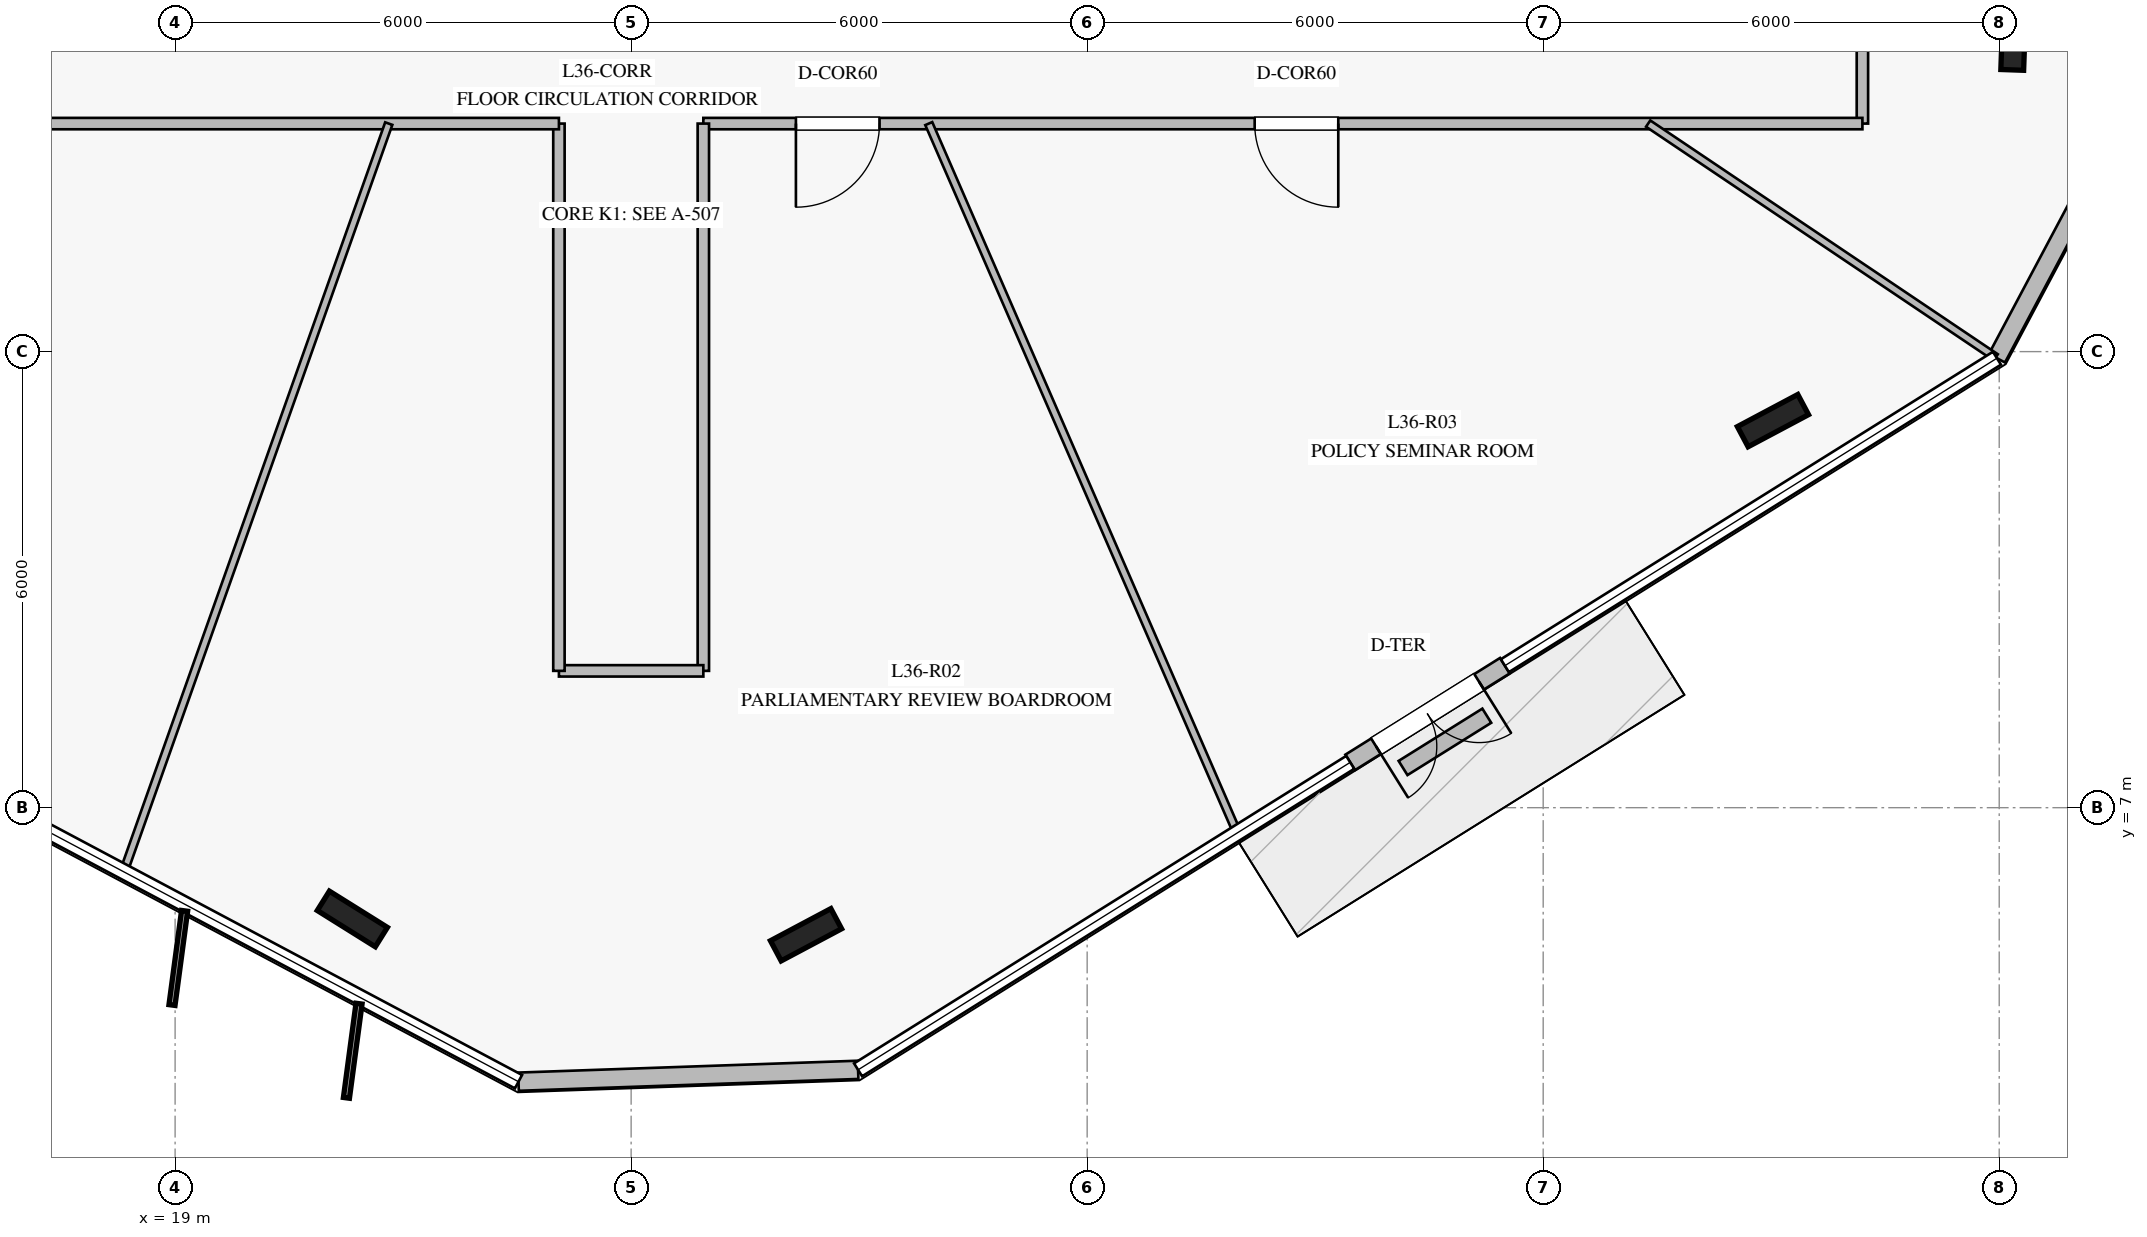
"""IFC4 building model, lengths in metres.
Left out: names, types, materials, properties, quantities, classifications, styles, units other than length and angle.
Written with IfcOpenShell. Run it as: python <this file> out.ifc"""

import sys

from ifc_helpers import new_model, si_unit, direction, frame, frame_2d, origin, origin_2d, place, context, subcontext, project, spatial, rectangle, i_section, extrude, element, fill, save


model = new_model("IFC4")
c1 = context("Model", 3, precision=1e-05, world=origin(), true_north=direction((0.0, 1.0)))
c2 = subcontext(c1, "Body", "Model", "MODEL_VIEW")
j1 = project(units=[si_unit("LENGTHUNIT", "METRE"), si_unit("PLANEANGLEUNIT", "RADIAN")], contexts=[c1])
p1 = place(None, origin())
s1 = spatial("IfcSite", under=j1, at=p1, CompositionType="ELEMENT")
p2 = place(p1, origin())
s2 = spatial("IfcBuilding", under=s1, at=p2, CompositionType="ELEMENT")
p3 = place(p2, frame((0.0, 0.0, 150.4)))
s3 = spatial("IfcBuildingStorey", under=s2, at=p3, CompositionType="ELEMENT", Elevation=150.4)
for number, where, z_axis, x_axis in (
    (1, (21.332, 5.536, 0.0), (0.0, 0.0, 1.0), (-0.848, 0.53, 0.0)),
    (2, (27.301, 5.328, 0.0), (0.0, 0.0, 1.0), (0.883, 0.469, 0.0)),
    (3, (40.023, 12.092, 0.0), (0.0, 0.0, 1.0), (0.883, 0.469, 0.0)),
):
    element("IfcColumn", number, at=place(p3, frame(where, z_axis=z_axis, x_axis=x_axis)), inside=s3, PredefinedType="COLUMN", context=c2, shape_type="SweptSolid", body=[
        extrude(i_section(OverallWidth=0.3, OverallDepth=0.9, WebThickness=0.019, FlangeThickness=0.035, at=origin_2d()), origin(), (0.0, 0.0, 1.0), 4.0),
    ])
p4 = place(p3, frame((23.518, 3.395, 0.0), z_axis=(0.0, 0.0, 1.0), x_axis=(0.999390988908, 0.034894860495, 0.0)))
e4 = element("IfcWall", 4, at=p4, inside=s3, PredefinedType="STANDARD", context=c2, shape_type="SweptSolid", body=[
    extrude(rectangle(XDim=4.471, YDim=0.24, at=frame_2d((2.235, 0.0))), origin(), (0.0, 0.0, 1.0), 3.76),
])
p5 = place(p3, frame((34.461, 7.596, 0.0), z_axis=(0.0, 0.0, 1.0), x_axis=(0.847998304005, 0.529998940003, 0.0)))
e5 = element("IfcWall", 5, at=p5, inside=s3, PredefinedType="STANDARD", context=c2, shape_type="SweptSolid", body=[
    extrude(rectangle(XDim=2.4, YDim=0.24, at=frame_2d((1.2, 0.0))), origin(), (0.0, 0.0, 1.0), 3.76),
])
p6 = place(p5, frame((0.4, 0.0, 0.0)))
e6 = element("IfcOpeningElement", 6, at=p6, cuts=e5, PredefinedType="OPENING", context=c2, shape_type="SweptSolid", body=[
    extrude(rectangle(XDim=1.6, YDim=2.25, at=frame_2d((0.8, 1.125))), frame((0.0, 0.13, 0.0), z_axis=(0.0, -1.0, 0.0), x_axis=(1.0, 0.0, 0.0)), (0.0, 0.0, 1.0), 0.26),
])
p7 = place(p3, frame((42.97, 12.913, 0.0), z_axis=(0.0, 0.0, 1.0), x_axis=(0.46919913514, 0.883092391307, 0.0)))
e7 = element("IfcWall", 7, at=p7, inside=s3, PredefinedType="STANDARD", context=c2, shape_type="SweptSolid", body=[
    extrude(rectangle(XDim=4.472, YDim=0.24, at=frame_2d((2.236, 0.0))), origin(), (0.0, 0.0, 1.0), 3.76),
])
p8 = place(p3, frame((35.156, 7.522, 0.0), z_axis=(0.0, 0.0, 1.0), x_axis=(0.848272680747, 0.52955968417, 0.0)))
e8 = element("IfcWall", 8, at=p8, inside=s3, PredefinedType="USERDEFINED", context=c2, shape_type="SweptSolid", body=[
    extrude(rectangle(XDim=1.299, YDim=0.22, at=frame_2d((0.649, 0.0))), origin(), (0.0, 0.0, 1.0), 0.4),
])
p9 = place(p3, frame((41.2, 17.8, 0.0), z_axis=(0.0, 0.0, 1.0), x_axis=(0.0, -1.0, 0.0)))
e9 = element("IfcWall", 9, at=p9, inside=s3, PredefinedType="PARTITIONING", context=c2, shape_type="SweptSolid", body=[
    extrude(rectangle(XDim=1.8, YDim=0.15, at=frame_2d((0.9, 0.0))), origin(), (0.0, 0.0, 1.0), 3.21),
])
p10 = place(p3, frame((41.2, 16.0, 0.0), z_axis=(0.0, 0.0, 1.0), x_axis=(-1.0, 0.0, 0.0)))
e10 = element("IfcWall", 10, at=p10, inside=s3, PredefinedType="PARTITIONING", context=c2, shape_type="SweptSolid", body=[
    extrude(rectangle(XDim=15.25, YDim=0.15, at=frame_2d((7.625, 0.0))), origin(), (0.0, 0.0, 1.0), 3.21),
])
p11 = place(p10, frame((12.932, 0.0, 0.0)))
e11 = element("IfcOpeningElement", 11, at=p11, cuts=e10, PredefinedType="OPENING", context=c2, shape_type="SweptSolid", body=[
    extrude(rectangle(XDim=1.1, YDim=2.2, at=frame_2d((0.55, 1.1))), frame((0.0, 0.085, 0.0), z_axis=(0.0, -1.0, 0.0), x_axis=(1.0, 0.0, 0.0)), (0.0, 0.0, 1.0), 0.17),
])
p12 = place(p10, frame((6.896, 0.0, 0.0)))
e12 = element("IfcOpeningElement", 12, at=p12, cuts=e10, PredefinedType="OPENING", context=c2, shape_type="SweptSolid", body=[
    extrude(rectangle(XDim=1.1, YDim=2.2, at=frame_2d((0.55, 1.1))), frame((0.0, 0.085, 0.0), z_axis=(0.0, -1.0, 0.0), x_axis=(1.0, 0.0, 0.0)), (0.0, 0.0, 1.0), 0.17),
])
p13 = place(p3, frame((25.95, 16.0, 0.0), z_axis=(0.0, 0.0, 1.0), x_axis=(0.0, -1.0, 0.0)))
e13 = element("IfcWall", 13, at=p13, inside=s3, PredefinedType="PARTITIONING", context=c2, shape_type="SweptSolid", body=[
    extrude(rectangle(XDim=7.2, YDim=0.15, at=frame_2d((3.6, 0.0))), origin(), (0.0, 0.0, 1.0), 3.36),
])
p14 = place(p3, frame((25.95, 8.8, 0.0), z_axis=(0.0, 0.0, 1.0), x_axis=(-1.0, 0.0, 0.0)))
e14 = element("IfcWall", 14, at=p14, inside=s3, PredefinedType="PARTITIONING", context=c2, shape_type="SweptSolid", body=[
    extrude(rectangle(XDim=1.9, YDim=0.15, at=frame_2d((0.95, 0.0))), origin(), (0.0, 0.0, 1.0), 3.76),
])
p15 = place(p3, frame((24.05, 8.8, 0.0), z_axis=(0.0, 0.0, 1.0), x_axis=(0.0, 1.0, 0.0)))
e15 = element("IfcWall", 15, at=p15, inside=s3, PredefinedType="PARTITIONING", context=c2, shape_type="SweptSolid", body=[
    extrude(rectangle(XDim=7.2, YDim=0.15, at=frame_2d((3.6, 0.0))), origin(), (0.0, 0.0, 1.0), 3.36),
])
p16 = place(p3, frame((24.05, 16.0, 0.0), z_axis=(0.0, 0.0, 1.0), x_axis=(-1.0, 0.0, 0.0)))
e16 = element("IfcWall", 16, at=p16, inside=s3, PredefinedType="PARTITIONING", context=c2, shape_type="SweptSolid", body=[
    extrude(rectangle(XDim=6.85, YDim=0.15, at=frame_2d((3.425, 0.0))), origin(), (0.0, 0.0, 1.0), 3.21),
])
p17 = place(p3, frame((21.811, 16.0, 0.0), z_axis=(0.0, 0.0, 1.0), x_axis=(-0.333981087617, -0.942579775464, 0.0)))
e17 = element("IfcWall", 17, at=p17, inside=s3, PredefinedType="MOVABLE", context=c2, shape_type="SweptSolid", body=[
    extrude(rectangle(XDim=10.426, YDim=0.1, at=frame_2d((5.213, 0.0))), origin(), (0.0, 0.0, 1.0), 3.16),
])
p18 = place(p3, frame((28.916, 16.0, 0.0), z_axis=(0.0, 0.0, 1.0), x_axis=(0.398858798929, -0.917012354615, 0.0)))
e18 = element("IfcWall", 18, at=p18, inside=s3, PredefinedType="MOVABLE", context=c2, shape_type="SweptSolid", body=[
    extrude(rectangle(XDim=10.159, YDim=0.1, at=frame_2d((5.08, 0.0))), origin(), (0.0, 0.0, 1.0), 3.16),
])
p19 = place(p3, frame((38.381, 16.0, 0.0), z_axis=(0.0, 0.0, 1.0), x_axis=(0.829760156415, -0.55812013297, 0.0)))
e19 = element("IfcWall", 19, at=p19, inside=s3, PredefinedType="MOVABLE", context=c2, shape_type="SweptSolid", body=[
    extrude(rectangle(XDim=5.511, YDim=0.1, at=frame_2d((2.756, 0.0))), origin(), (0.0, 0.0, 1.0), 3.16),
])
p20 = place(p6, frame((1.6, 0.0, 0.0), z_axis=(0.0, 0.0, 1.0), x_axis=(-1.0, 0.0, 0.0)))
e20 = element("IfcDoor", 20, at=p20, inside=s3, OperationType="DOUBLE_DOOR_SINGLE_SWING", PredefinedType="DOOR", context=c2, shape_type="SweptSolid", body=[
    extrude(rectangle(XDim=1.6, YDim=2.25, at=frame_2d((0.8, 1.125))), frame((0.0, 0.025, 0.0), z_axis=(0.0, -1.0, 0.0), x_axis=(1.0, 0.0, 0.0)), (0.0, 0.0, 1.0), 0.05),
])
fill(e6, e20)
p21 = place(p11, origin())
e21 = element("IfcDoor", 21, at=p21, inside=s3, OperationType="SINGLE_SWING_RIGHT", PredefinedType="DOOR", context=c2, shape_type="SweptSolid", body=[
    extrude(rectangle(XDim=1.1, YDim=2.2, at=frame_2d((0.55, 1.1))), frame((0.0, 0.025, 0.0), z_axis=(0.0, -1.0, 0.0), x_axis=(1.0, 0.0, 0.0)), (0.0, 0.0, 1.0), 0.05),
])
fill(e11, e21)
p22 = place(p12, origin())
e22 = element("IfcDoor", 22, at=p22, inside=s3, OperationType="SINGLE_SWING_LEFT", PredefinedType="DOOR", context=c2, shape_type="SweptSolid", body=[
    extrude(rectangle(XDim=1.1, YDim=2.2, at=frame_2d((0.55, 1.1))), frame((0.0, 0.025, 0.0), z_axis=(0.0, -1.0, 0.0), x_axis=(1.0, 0.0, 0.0)), (0.0, 0.0, 1.0), 0.05),
])
fill(e12, e22)
save(model, sys.argv[1])
